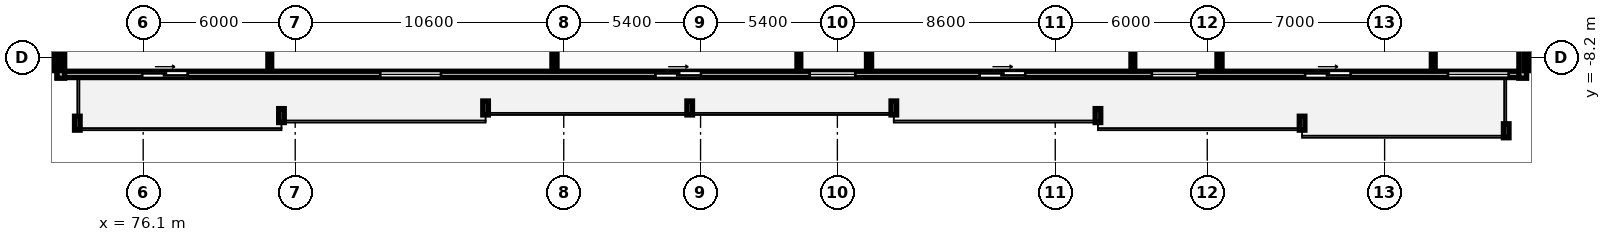
"""IFC4 building model, lengths in metres.
Left out: names, types, materials, properties, quantities, classifications, styles, units other than length and angle.
Written with IfcOpenShell. Run it as: python <this file> out.ifc"""

import sys

from ifc_helpers import new_model, si_unit, direction, frame, frame_2d, origin, place, context, subcontext, project, spatial, rectangle, extrude, element, fill, save


model = new_model("IFC4")
c1 = context("Model", 3, precision=1e-05, world=origin(), true_north=direction((0.0, 1.0)))
c2 = subcontext(c1, "Body", "Model", "MODEL_VIEW")
j1 = project(units=[si_unit("LENGTHUNIT", "METRE"), si_unit("PLANEANGLEUNIT", "RADIAN")], contexts=[c1])
p1 = place(None, origin())
s1 = spatial("IfcSite", under=j1, at=p1, CompositionType="ELEMENT")
p2 = place(p1, origin())
s2 = spatial("IfcBuilding", under=s1, at=p2, CompositionType="ELEMENT")
p3 = place(p2, frame((0.0, 0.0, 106.8)))
s3 = spatial("IfcBuildingStorey", under=s2, at=p3, CompositionType="ELEMENT", Elevation=106.8)
p4 = place(p3, frame((72.7, -8.85, 0.0), z_axis=(0.0, 0.0, 1.0), x_axis=(1.0, 0.0, 0.0)))
e1 = element("IfcWall", 1, at=p4, inside=s3, PredefinedType="STANDARD", context=c2, shape_type="SweptSolid", body=[
    extrude(rectangle(XDim=58.0, YDim=0.25, at=frame_2d((29.0, 0.0))), origin(), (0.0, 0.0, 1.0), 2.97),
])
p5 = place(p4, frame((3.358, 0.0, 0.0)))
e2 = element("IfcOpeningElement", 2, at=p5, cuts=e1, PredefinedType="OPENING", context=c2, shape_type="SweptSolid", body=[
    extrude(rectangle(XDim=1.8, YDim=2.2, at=frame_2d((0.9, 1.1))), frame((0.0, 0.135, 0.0), z_axis=(0.0, -1.0, 0.0), x_axis=(1.0, 0.0, 0.0)), (0.0, 0.0, 1.0), 0.27),
])
p6 = place(p4, frame((12.755, 0.0, 0.85)))
e3 = element("IfcOpeningElement", 3, at=p6, cuts=e1, PredefinedType="OPENING", context=c2, shape_type="SweptSolid", body=[
    extrude(rectangle(XDim=2.4, YDim=1.9, at=frame_2d((1.2, 0.95))), frame((0.0, 0.135, 0.0), z_axis=(0.0, -1.0, 0.0), x_axis=(1.0, 0.0, 0.0)), (0.0, 0.0, 1.0), 0.27),
])
p7 = place(p4, frame((23.617, 0.0, 0.0)))
e4 = element("IfcOpeningElement", 4, at=p7, cuts=e1, PredefinedType="OPENING", context=c2, shape_type="SweptSolid", body=[
    extrude(rectangle(XDim=1.8, YDim=2.2, at=frame_2d((0.9, 1.1))), frame((0.0, 0.135, 0.0), z_axis=(0.0, -1.0, 0.0), x_axis=(1.0, 0.0, 0.0)), (0.0, 0.0, 1.0), 0.27),
])
p8 = place(p4, frame((29.705, 0.0, 0.85)))
e5 = element("IfcOpeningElement", 5, at=p8, cuts=e1, PredefinedType="OPENING", context=c2, shape_type="SweptSolid", body=[
    extrude(rectangle(XDim=1.8, YDim=1.8, at=frame_2d((0.9, 0.9))), frame((0.0, 0.135, 0.0), z_axis=(0.0, -1.0, 0.0), x_axis=(1.0, 0.0, 0.0)), (0.0, 0.0, 1.0), 0.27),
])
p9 = place(p4, frame((36.417, 0.0, 0.0)))
e6 = element("IfcOpeningElement", 6, at=p9, cuts=e1, PredefinedType="OPENING", context=c2, shape_type="SweptSolid", body=[
    extrude(rectangle(XDim=1.8, YDim=2.2, at=frame_2d((0.9, 1.1))), frame((0.0, 0.135, 0.0), z_axis=(0.0, -1.0, 0.0), x_axis=(1.0, 0.0, 0.0)), (0.0, 0.0, 1.0), 0.27),
])
p10 = place(p4, frame((43.213, 0.0, 0.85)))
e7 = element("IfcOpeningElement", 7, at=p10, cuts=e1, PredefinedType="OPENING", context=c2, shape_type="SweptSolid", body=[
    extrude(rectangle(XDim=1.8, YDim=1.8, at=frame_2d((0.9, 0.9))), frame((0.0, 0.135, 0.0), z_axis=(0.0, -1.0, 0.0), x_axis=(1.0, 0.0, 0.0)), (0.0, 0.0, 1.0), 0.27),
])
p11 = place(p4, frame((49.262, 0.0, 0.0)))
e8 = element("IfcOpeningElement", 8, at=p11, cuts=e1, PredefinedType="OPENING", context=c2, shape_type="SweptSolid", body=[
    extrude(rectangle(XDim=1.8, YDim=2.2, at=frame_2d((0.9, 1.1))), frame((0.0, 0.135, 0.0), z_axis=(0.0, -1.0, 0.0), x_axis=(1.0, 0.0, 0.0)), (0.0, 0.0, 1.0), 0.27),
])
p12 = place(p4, frame((54.9, 0.0, 0.85)))
e9 = element("IfcOpeningElement", 9, at=p12, cuts=e1, PredefinedType="OPENING", context=c2, shape_type="SweptSolid", body=[
    extrude(rectangle(XDim=2.4, YDim=1.9, at=frame_2d((1.2, 0.95))), frame((0.0, 0.135, 0.0), z_axis=(0.0, -1.0, 0.0), x_axis=(1.0, 0.0, 0.0)), (0.0, 0.0, 1.0), 0.27),
])
for number, where, z_axis, x_axis in (
    (10, (130.55, -9.0, 0.0), (0.0, 0.0, 1.0), (0.0, 1.0, 0.0)),
    (11, (72.85, -5.4, 0.0), (0.0, 0.0, 1.0), (0.0, -1.0, 0.0)),
):
    element("IfcWall", number, at=place(p3, frame(where, z_axis=z_axis, x_axis=x_axis)), inside=s3, PredefinedType="STANDARD", context=c2, shape_type="SweptSolid", body=[
        extrude(rectangle(XDim=3.6, YDim=0.3, at=frame_2d((1.8, 0.0))), origin(), (0.0, 0.0, 1.0), 2.97),
    ])
for number, where, z_axis, x_axis in (
    (12, (72.7, -8.7, 0.0), (0.0, 0.0, 1.0), (0.0, 1.0, 0.0)),
    (13, (130.7, -8.7, 0.0), (0.0, 0.0, 1.0), (0.0, 1.0, 0.0)),
    (14, (92.333, -8.7, 0.0), (0.0, 0.0, 1.0), (0.0, 1.0, 0.0)),
):
    element("IfcWall", number, at=place(p3, frame(where, z_axis=z_axis, x_axis=x_axis)), inside=s3, PredefinedType="PARTITIONING", context=c2, shape_type="SweptSolid", body=[
        extrude(rectangle(XDim=24.57, YDim=0.2, at=frame_2d((12.285, 0.0))), origin(), (0.0, 0.0, 1.0), 2.97),
    ])
p13 = place(p3, frame((81.097, -8.7, 0.0), z_axis=(0.0, 0.0, 1.0), x_axis=(0.0, 1.0, 0.0)))
e15 = element("IfcWall", 15, at=p13, inside=s3, PredefinedType="PARTITIONING", context=c2, shape_type="SweptSolid", body=[
    extrude(rectangle(XDim=5.17, YDim=0.15, at=frame_2d((2.585, 0.0))), origin(), (0.0, 0.0, 1.0), 2.97),
])
p14 = place(p3, frame((104.75, -8.7, 0.0), z_axis=(0.0, 0.0, 1.0), x_axis=(0.0, 1.0, 0.0)))
e16 = element("IfcWall", 16, at=p14, inside=s3, PredefinedType="PARTITIONING", context=c2, shape_type="SweptSolid", body=[
    extrude(rectangle(XDim=24.57, YDim=0.2, at=frame_2d((12.285, 0.0))), origin(), (0.0, 0.0, 1.0), 2.97),
])
p15 = place(p3, frame((101.98, -8.7, 0.0), z_axis=(0.0, 0.0, 1.0), x_axis=(0.0, 1.0, 0.0)))
e17 = element("IfcWall", 17, at=p15, inside=s3, PredefinedType="PARTITIONING", context=c2, shape_type="SweptSolid", body=[
    extrude(rectangle(XDim=10.31, YDim=0.15, at=frame_2d((5.155, 0.0))), origin(), (0.0, 0.0, 1.0), 2.97),
])
p16 = place(p15, frame((6.12, 0.0, 0.0)))
e18 = element("IfcOpeningElement", 18, at=p16, cuts=e17, PredefinedType="OPENING", context=c2, shape_type="SweptSolid", body=[
    extrude(rectangle(XDim=0.84, YDim=2.04, at=frame_2d((0.42, 1.02))), frame((0.0, 0.085, 0.0), z_axis=(0.0, -1.0, 0.0), x_axis=(1.0, 0.0, 0.0)), (0.0, 0.0, 1.0), 0.17),
])
p17 = place(p15, frame((8.04, 0.0, 0.0)))
e19 = element("IfcOpeningElement", 19, at=p17, cuts=e17, PredefinedType="OPENING", context=c2, shape_type="SweptSolid", body=[
    extrude(rectangle(XDim=0.84, YDim=2.04, at=frame_2d((0.42, 1.02))), frame((0.0, 0.085, 0.0), z_axis=(0.0, -1.0, 0.0), x_axis=(1.0, 0.0, 0.0)), (0.0, 0.0, 1.0), 0.17),
])
p18 = place(p15, frame((2.001, 0.0, 0.0)))
e20 = element("IfcOpeningElement", 20, at=p18, cuts=e17, PredefinedType="OPENING", context=c2, shape_type="SweptSolid", body=[
    extrude(rectangle(XDim=0.88, YDim=2.06, at=frame_2d((0.44, 1.03))), frame((0.0, 0.085, 0.0), z_axis=(0.0, -1.0, 0.0), x_axis=(1.0, 0.0, 0.0)), (0.0, 0.0, 1.0), 0.17),
])
p19 = place(p3, frame((118.583, -8.7, 0.0), z_axis=(0.0, 0.0, 1.0), x_axis=(0.0, 1.0, 0.0)))
e21 = element("IfcWall", 21, at=p19, inside=s3, PredefinedType="PARTITIONING", context=c2, shape_type="SweptSolid", body=[
    extrude(rectangle(XDim=24.57, YDim=0.2, at=frame_2d((12.285, 0.0))), origin(), (0.0, 0.0, 1.0), 2.97),
])
p20 = place(p3, frame((115.163, -8.7, 0.0), z_axis=(0.0, 0.0, 1.0), x_axis=(0.0, 1.0, 0.0)))
e22 = element("IfcWall", 22, at=p20, inside=s3, PredefinedType="PARTITIONING", context=c2, shape_type="SweptSolid", body=[
    extrude(rectangle(XDim=10.31, YDim=0.15, at=frame_2d((5.155, 0.0))), origin(), (0.0, 0.0, 1.0), 2.97),
])
p21 = place(p20, frame((5.55, 0.0, 0.0)))
e23 = element("IfcOpeningElement", 23, at=p21, cuts=e22, PredefinedType="OPENING", context=c2, shape_type="SweptSolid", body=[
    extrude(rectangle(XDim=0.84, YDim=2.04, at=frame_2d((0.42, 1.02))), frame((0.0, 0.085, 0.0), z_axis=(0.0, -1.0, 0.0), x_axis=(1.0, 0.0, 0.0)), (0.0, 0.0, 1.0), 0.17),
])
p22 = place(p20, frame((8.04, 0.0, 0.0)))
e24 = element("IfcOpeningElement", 24, at=p22, cuts=e22, PredefinedType="OPENING", context=c2, shape_type="SweptSolid", body=[
    extrude(rectangle(XDim=0.84, YDim=2.04, at=frame_2d((0.42, 1.02))), frame((0.0, 0.085, 0.0), z_axis=(0.0, -1.0, 0.0), x_axis=(1.0, 0.0, 0.0)), (0.0, 0.0, 1.0), 0.17),
])
p23 = place(p20, frame((3.95, 0.0, 0.0)))
e25 = element("IfcOpeningElement", 25, at=p23, cuts=e22, PredefinedType="OPENING", context=c2, shape_type="SweptSolid", body=[
    extrude(rectangle(XDim=0.88, YDim=2.06, at=frame_2d((0.44, 1.03))), frame((0.0, 0.085, 0.0), z_axis=(0.0, -1.0, 0.0), x_axis=(1.0, 0.0, 0.0)), (0.0, 0.0, 1.0), 0.17),
])
p24 = place(p3, frame((127.02, -8.7, 0.0), z_axis=(0.0, 0.0, 1.0), x_axis=(0.0, 1.0, 0.0)))
e26 = element("IfcWall", 26, at=p24, inside=s3, PredefinedType="PARTITIONING", context=c2, shape_type="SweptSolid", body=[
    extrude(rectangle(XDim=10.31, YDim=0.15, at=frame_2d((5.155, 0.0))), origin(), (0.0, 0.0, 1.0), 2.97),
])
p25 = place(p24, frame((6.12, 0.0, 0.0)))
e27 = element("IfcOpeningElement", 27, at=p25, cuts=e26, PredefinedType="OPENING", context=c2, shape_type="SweptSolid", body=[
    extrude(rectangle(XDim=0.84, YDim=2.04, at=frame_2d((0.42, 1.02))), frame((0.0, 0.085, 0.0), z_axis=(0.0, -1.0, 0.0), x_axis=(1.0, 0.0, 0.0)), (0.0, 0.0, 1.0), 0.17),
])
p26 = place(p24, frame((8.04, 0.0, 0.0)))
e28 = element("IfcOpeningElement", 28, at=p26, cuts=e26, PredefinedType="OPENING", context=c2, shape_type="SweptSolid", body=[
    extrude(rectangle(XDim=0.84, YDim=2.04, at=frame_2d((0.42, 1.02))), frame((0.0, 0.085, 0.0), z_axis=(0.0, -1.0, 0.0), x_axis=(1.0, 0.0, 0.0)), (0.0, 0.0, 1.0), 0.17),
])
p27 = place(p24, frame((2.001, 0.0, 0.0)))
e29 = element("IfcOpeningElement", 29, at=p27, cuts=e26, PredefinedType="OPENING", context=c2, shape_type="SweptSolid", body=[
    extrude(rectangle(XDim=0.88, YDim=2.06, at=frame_2d((0.44, 1.03))), frame((0.0, 0.085, 0.0), z_axis=(0.0, -1.0, 0.0), x_axis=(1.0, 0.0, 0.0)), (0.0, 0.0, 1.0), 0.17),
])
p28 = place(p5, origin())
e30 = element("IfcDoor", 30, at=p28, inside=s3, OperationType="SLIDING_TO_RIGHT", PredefinedType="DOOR", context=c2, shape_type="SweptSolid", body=[
    extrude(rectangle(XDim=1.8, YDim=2.2, at=frame_2d((0.9, 1.1))), frame((0.0, 0.025, 0.0), z_axis=(0.0, -1.0, 0.0), x_axis=(1.0, 0.0, 0.0)), (0.0, 0.0, 1.0), 0.05),
])
fill(e2, e30)
p29 = place(p6, origin())
e31 = element("IfcWindow", 31, at=p29, inside=s3, PartitioningType="DOUBLE_PANEL_VERTICAL", PredefinedType="WINDOW", context=c2, shape_type="SweptSolid", body=[
    extrude(rectangle(XDim=2.4, YDim=1.9, at=frame_2d((1.2, 0.95))), frame((0.0, 0.03, 0.0), z_axis=(0.0, -1.0, 0.0), x_axis=(1.0, 0.0, 0.0)), (0.0, 0.0, 1.0), 0.06),
])
fill(e3, e31)
p30 = place(p7, origin())
e32 = element("IfcDoor", 32, at=p30, inside=s3, OperationType="SLIDING_TO_RIGHT", PredefinedType="DOOR", context=c2, shape_type="SweptSolid", body=[
    extrude(rectangle(XDim=1.8, YDim=2.2, at=frame_2d((0.9, 1.1))), frame((0.0, 0.025, 0.0), z_axis=(0.0, -1.0, 0.0), x_axis=(1.0, 0.0, 0.0)), (0.0, 0.0, 1.0), 0.05),
])
fill(e4, e32)
p31 = place(p8, origin())
e33 = element("IfcWindow", 33, at=p31, inside=s3, PartitioningType="SINGLE_PANEL", PredefinedType="WINDOW", context=c2, shape_type="SweptSolid", body=[
    extrude(rectangle(XDim=1.8, YDim=1.8, at=frame_2d((0.9, 0.9))), frame((0.0, 0.03, 0.0), z_axis=(0.0, -1.0, 0.0), x_axis=(1.0, 0.0, 0.0)), (0.0, 0.0, 1.0), 0.06),
])
fill(e5, e33)
p32 = place(p9, origin())
e34 = element("IfcDoor", 34, at=p32, inside=s3, OperationType="SLIDING_TO_RIGHT", PredefinedType="DOOR", context=c2, shape_type="SweptSolid", body=[
    extrude(rectangle(XDim=1.8, YDim=2.2, at=frame_2d((0.9, 1.1))), frame((0.0, 0.025, 0.0), z_axis=(0.0, -1.0, 0.0), x_axis=(1.0, 0.0, 0.0)), (0.0, 0.0, 1.0), 0.05),
])
fill(e6, e34)
p33 = place(p10, origin())
e35 = element("IfcWindow", 35, at=p33, inside=s3, PartitioningType="SINGLE_PANEL", PredefinedType="WINDOW", context=c2, shape_type="SweptSolid", body=[
    extrude(rectangle(XDim=1.8, YDim=1.8, at=frame_2d((0.9, 0.9))), frame((0.0, 0.03, 0.0), z_axis=(0.0, -1.0, 0.0), x_axis=(1.0, 0.0, 0.0)), (0.0, 0.0, 1.0), 0.06),
])
fill(e7, e35)
p34 = place(p11, origin())
e36 = element("IfcDoor", 36, at=p34, inside=s3, OperationType="SLIDING_TO_RIGHT", PredefinedType="DOOR", context=c2, shape_type="SweptSolid", body=[
    extrude(rectangle(XDim=1.8, YDim=2.2, at=frame_2d((0.9, 1.1))), frame((0.0, 0.025, 0.0), z_axis=(0.0, -1.0, 0.0), x_axis=(1.0, 0.0, 0.0)), (0.0, 0.0, 1.0), 0.05),
])
fill(e8, e36)
p35 = place(p12, origin())
e37 = element("IfcWindow", 37, at=p35, inside=s3, PartitioningType="DOUBLE_PANEL_VERTICAL", PredefinedType="WINDOW", context=c2, shape_type="SweptSolid", body=[
    extrude(rectangle(XDim=2.4, YDim=1.9, at=frame_2d((1.2, 0.95))), frame((0.0, 0.03, 0.0), z_axis=(0.0, -1.0, 0.0), x_axis=(1.0, 0.0, 0.0)), (0.0, 0.0, 1.0), 0.06),
])
fill(e9, e37)
save(model, sys.argv[1])
